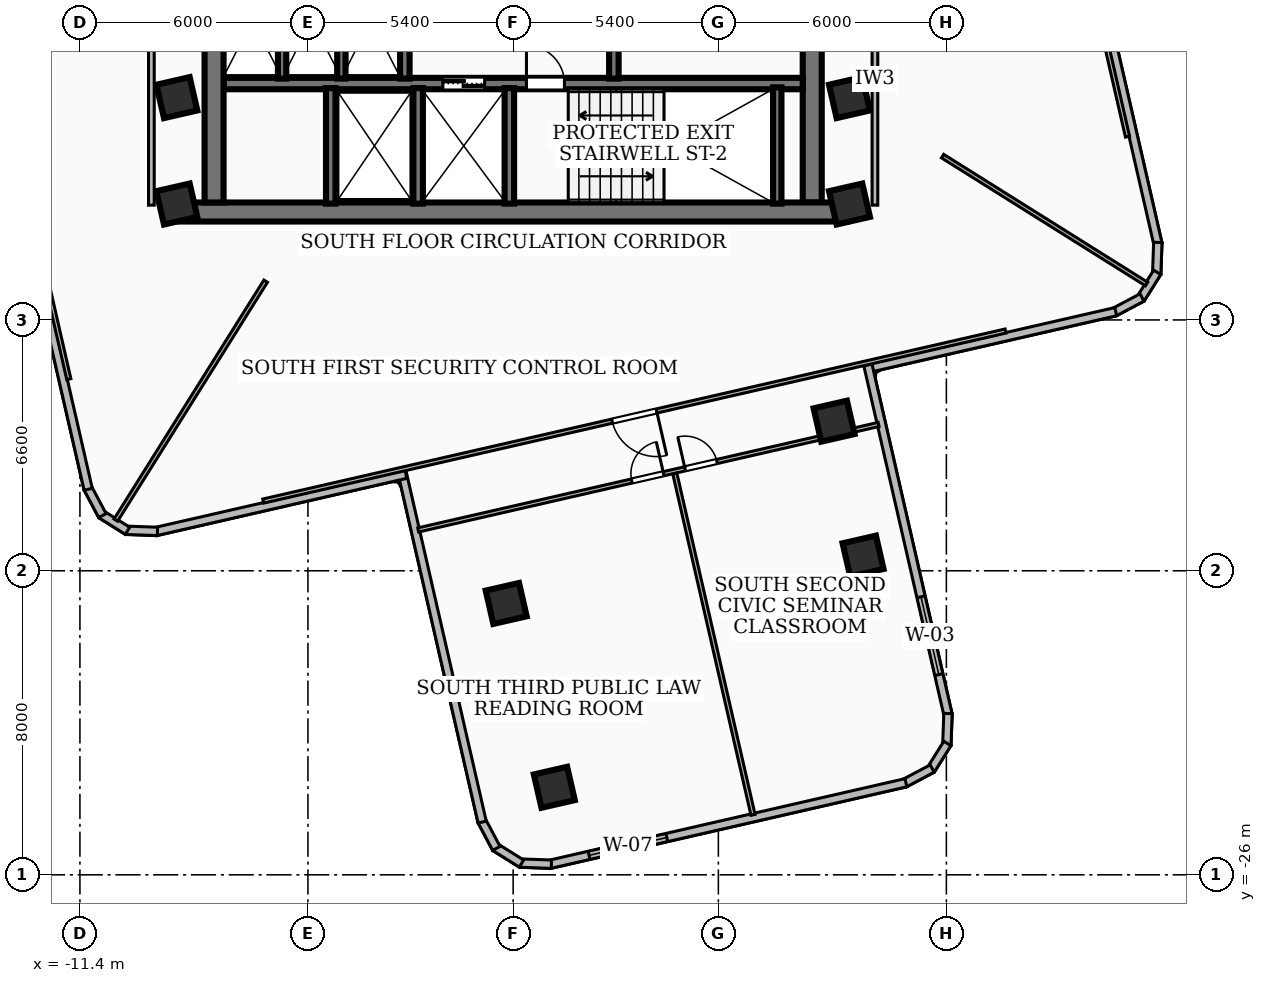
"""IFC4 building model, lengths in metres.
Left out: names, types, materials, properties, quantities, classifications, styles, units other than length and angle.
Written with IfcOpenShell. Run it as: python <this file> out.ifc"""

import sys

from ifc_helpers import new_model, si_unit, direction, frame, frame_2d, origin, origin_2d, place, context, subcontext, project, spatial, rectangle, extrude, element, fill, save


model = new_model("IFC4")
c1 = context("Model", 3, precision=1e-05, world=origin(), true_north=direction((0.0, 1.0)))
c2 = subcontext(c1, "Body", "Model", "MODEL_VIEW")
j1 = project(units=[si_unit("LENGTHUNIT", "METRE"), si_unit("PLANEANGLEUNIT", "RADIAN")], contexts=[c1])
p1 = place(None, origin())
s1 = spatial("IfcSite", under=j1, at=p1, CompositionType="ELEMENT")
p2 = place(p1, origin())
s2 = spatial("IfcBuilding", under=s1, at=p2, CompositionType="ELEMENT")
p3 = place(p2, frame((0.0, 0.0, 119.88)))
s3 = spatial("IfcBuildingStorey", under=s2, at=p3, CompositionType="ELEMENT", Elevation=119.88)
p4 = place(p3, frame((8.78, -8.56, 0.0), z_axis=(0.0, 0.0, 1.0), x_axis=(-1.0, 0.0, 0.0)))
e1 = element("IfcWall", 1, at=p4, inside=s3, PredefinedType="SHEAR", context=c2, shape_type="SweptSolid", body=[
    extrude(rectangle(XDim=17.56, YDim=0.5, at=frame_2d((8.78, 0.0))), origin(), (0.0, 0.0, 1.0), 3.34),
])
for number, where, z_axis, x_axis in (
    (2, (-7.87, -8.31, 0.0), (0.0, 0.0, 1.0), (0.0, 1.0, 0.0)),
    (3, (7.87, -2.0, 0.0), (0.0, 0.0, 1.0), (0.0, -1.0, 0.0)),
):
    element("IfcWall", number, at=place(p3, frame(where, z_axis=z_axis, x_axis=x_axis)), inside=s3, PredefinedType="SHEAR", context=c2, shape_type="SweptSolid", body=[
        extrude(rectangle(XDim=6.31, YDim=0.5, at=frame_2d((3.155, 0.0))), origin(), (0.0, 0.0, 1.0), 3.34),
    ])
p5 = place(p3, frame((-7.62, -5.18, 0.0), z_axis=(0.0, 0.0, 1.0), x_axis=(1.0, 0.0, 0.0)))
e4 = element("IfcWall", 4, at=p5, inside=s3, PredefinedType="SOLIDWALL", context=c2, shape_type="SweptSolid", body=[
    extrude(rectangle(XDim=15.24, YDim=0.3, at=frame_2d((7.62, 0.0))), origin(), (0.0, 0.0, 1.0), 3.34),
])
p6 = place(p5, frame((5.77, 0.0, 0.0)))
e5 = element("IfcOpeningElement", 5, at=p6, cuts=e4, PredefinedType="OPENING", context=c2, shape_type="SweptSolid", body=[
    extrude(rectangle(XDim=1.1, YDim=2.15, at=frame_2d((0.55, 1.075))), frame((0.0, 0.16, 0.0), z_axis=(0.0, -1.0, 0.0), x_axis=(1.0, 0.0, 0.0)), (0.0, 0.0, 1.0), 0.32),
])
p7 = place(p5, frame((7.97, 0.0, 0.0)))
e6 = element("IfcOpeningElement", 6, at=p7, cuts=e4, PredefinedType="OPENING", context=c2, shape_type="SweptSolid", body=[
    extrude(rectangle(XDim=1.0, YDim=2.1, at=frame_2d((0.5, 1.05))), frame((0.0, 0.16, 0.0), z_axis=(0.0, -1.0, 0.0), x_axis=(1.0, 0.0, 0.0)), (0.0, 0.0, 1.0), 0.32),
])
p8 = place(p3, frame((6.95, -8.34, 0.0), z_axis=(0.0, 0.0, 1.0), x_axis=(0.0, 1.0, 0.0)))
e7 = element("IfcWall", 7, at=p8, inside=s3, PredefinedType="SOLIDWALL", context=c2, shape_type="SweptSolid", body=[
    extrude(rectangle(XDim=3.06, YDim=0.22, at=frame_2d((1.53, 0.0))), origin(), (0.0, 0.0, 1.0), 3.34),
])
for number, where, z_axis, x_axis in (
    (8, (-0.1, -8.34, 0.0), (0.0, 0.0, 1.0), (0.0, 1.0, 0.0)),
    (9, (-2.5, -8.34, 0.0), (0.0, 0.0, 1.0), (0.0, 1.0, 0.0)),
    (10, (-4.8, -8.34, 0.0), (0.0, 0.0, 1.0), (0.0, 1.0, 0.0)),
):
    element("IfcWall", number, at=place(p3, frame(where, z_axis=z_axis, x_axis=x_axis)), inside=s3, PredefinedType="SOLIDWALL", context=c2, shape_type="SweptSolid", body=[
        extrude(rectangle(XDim=3.04, YDim=0.25, at=frame_2d((1.52, 0.0))), origin(), (0.0, 0.0, 1.0), 3.34),
    ])
for number, where, z_axis, x_axis in (
    (11, (-2.85, -5.05, 0.0), (0.0, 0.0, 1.0), (0.0, 1.0, 0.0)),
    (12, (2.65, -5.05, 0.0), (0.0, 0.0, 1.0), (0.0, 1.0, 0.0)),
):
    element("IfcWall", number, at=place(p3, frame(where, z_axis=z_axis, x_axis=x_axis)), inside=s3, PredefinedType="SOLIDWALL", context=c2, shape_type="SweptSolid", body=[
        extrude(rectangle(XDim=3.07, YDim=0.25, at=frame_2d((1.535, 0.0))), origin(), (0.0, 0.0, 1.0), 3.34),
    ])
for number, where, z_axis, x_axis in (
    (13, (-6.08, -5.05, 0.0), (0.0, 0.0, 1.0), (0.0, 1.0, 0.0)),
    (14, (-4.52, -5.05, 0.0), (0.0, 0.0, 1.0), (0.0, 1.0, 0.0)),
):
    element("IfcWall", number, at=place(p3, frame(where, z_axis=z_axis, x_axis=x_axis)), inside=s3, PredefinedType="SOLIDWALL", context=c2, shape_type="SweptSolid", body=[
        extrude(rectangle(XDim=3.07, YDim=0.22, at=frame_2d((1.535, 0.0))), origin(), (0.0, 0.0, 1.0), 3.34),
    ])
for number, where, z_axis, x_axis in (
    (15, (-8.85, -5.55, 0.0), (0.0, 0.0, 1.0), (0.975, 0.223, 0.0)),
    (16, (8.85, -5.55, 0.0), (0.0, 0.0, 1.0), (0.975, 0.223, 0.0)),
    (17, (8.85, -8.35, 0.0), (0.0, 0.0, 1.0), (0.975, 0.223, 0.0)),
    (18, (-8.85, -8.35, 0.0), (0.0, 0.0, 1.0), (0.975, 0.223, 0.0)),
    (19, (-0.183, -18.86, 0.0), (0.0, 0.0, 1.0), (0.975, 0.223, 0.0)),
    (20, (8.445, -14.064, 0.0), (0.0, 0.0, 1.0), (0.975, 0.223, 0.0)),
    (21, (1.083, -23.697, 0.0), (0.0, 0.0, 1.0), (0.975, 0.223, 0.0)),
    (22, (9.208, -17.615, 0.0), (0.0, 0.0, 1.0), (0.975, 0.223, 0.0)),
):
    element("IfcColumn", number, at=place(p3, frame(where, z_axis=z_axis, x_axis=x_axis)), inside=s3, PredefinedType="COLUMN", context=c2, shape_type="SweptSolid", body=[
        extrude(rectangle(XDim=0.9, YDim=0.9, at=origin_2d()), origin(), (0.0, 0.0, 1.0), 3.6),
    ])
p9 = place(p3, frame((15.46, -2.821, 0.0), z_axis=(0.0, 0.0, 1.0), x_axis=(0.223278912438, -0.974754598481, 0.0)))
e23 = element("IfcWall", 23, at=p9, inside=s3, PredefinedType="SOLIDWALL", context=c2, shape_type="SweptSolid", body=[
    extrude(rectangle(XDim=6.759, YDim=0.22, at=frame_2d((3.379, 0.0))), origin(), (0.0, 0.0, 1.0), 3.34),
])
p10 = place(p3, frame((16.964, -9.36, 0.0), z_axis=(0.0, 0.0, 1.0), x_axis=(-0.035983706773, -0.999352376715, 0.0)))
e24 = element("IfcWall", 24, at=p10, inside=s3, PredefinedType="SOLIDWALL", context=c2, shape_type="SweptSolid", body=[
    extrude(rectangle(XDim=0.834, YDim=0.22, at=frame_2d((0.417, 0.0))), origin(), (0.0, 0.0, 1.0), 3.34),
])
p11 = place(p3, frame((16.948, -10.148, 0.0), z_axis=(0.0, 0.0, 1.0), x_axis=(-0.531096868492, -0.847311109497, 0.0)))
e25 = element("IfcWall", 25, at=p11, inside=s3, PredefinedType="SOLIDWALL", context=c2, shape_type="SweptSolid", body=[
    extrude(rectangle(XDim=0.819, YDim=0.22, at=frame_2d((0.41, 0.0))), origin(), (0.0, 0.0, 1.0), 3.34),
])
p12 = place(p3, frame((16.548, -10.809, 0.0), z_axis=(0.0, 0.0, 1.0), x_axis=(-0.883460266876, -0.468506090516, 0.0)))
e26 = element("IfcWall", 26, at=p12, inside=s3, PredefinedType="SOLIDWALL", context=c2, shape_type="SweptSolid", body=[
    extrude(rectangle(XDim=0.834, YDim=0.22, at=frame_2d((0.417, 0.0))), origin(), (0.0, 0.0, 1.0), 3.34),
])
p13 = place(p3, frame((15.857, -11.182, 0.0), z_axis=(0.0, 0.0, 1.0), x_axis=(-0.974754598481, -0.223278912438, 0.0)))
e27 = element("IfcWall", 27, at=p13, inside=s3, PredefinedType="SOLIDWALL", context=c2, shape_type="SweptSolid", body=[
    extrude(rectangle(XDim=6.759, YDim=0.22, at=frame_2d((3.379, 0.0))), origin(), (0.0, 0.0, 1.0), 3.34),
])
p14 = place(p3, frame((9.335, -12.585, 0.0), z_axis=(0.0, 0.0, 1.0), x_axis=(0.223290835532, -0.974751867281, 0.0)))
e28 = element("IfcWall", 28, at=p14, inside=s3, PredefinedType="SOLIDWALL", context=c2, shape_type="SweptSolid", body=[
    extrude(rectangle(XDim=9.459, YDim=0.22, at=frame_2d((4.729, 0.0))), origin(), (0.0, 0.0, 1.0), 3.34),
])
p15 = place(p14, frame((6.259, 0.0, 0.85)))
e29 = element("IfcOpeningElement", 29, at=p15, cuts=e28, PredefinedType="OPENING", context=c2, shape_type="SweptSolid", body=[
    extrude(rectangle(XDim=2.1, YDim=2.0, at=frame_2d((1.05, 1.0))), frame((0.0, 0.12, 0.0), z_axis=(0.0, -1.0, 0.0), x_axis=(1.0, 0.0, 0.0)), (0.0, 0.0, 1.0), 0.24),
])
p16 = place(p3, frame((11.442, -21.756, 0.0), z_axis=(0.0, 0.0, 1.0), x_axis=(-0.035691530512, -0.999362854348, 0.0)))
e30 = element("IfcWall", 30, at=p16, inside=s3, PredefinedType="SOLIDWALL", context=c2, shape_type="SweptSolid", body=[
    extrude(rectangle(XDim=0.834, YDim=0.22, at=frame_2d((0.417, 0.0))), origin(), (0.0, 0.0, 1.0), 3.34),
])
p17 = place(p3, frame((11.426, -22.544, 0.0), z_axis=(0.0, 0.0, 1.0), x_axis=(-0.53163377074, -0.846974340702, 0.0)))
e31 = element("IfcWall", 31, at=p17, inside=s3, PredefinedType="SOLIDWALL", context=c2, shape_type="SweptSolid", body=[
    extrude(rectangle(XDim=0.818, YDim=0.22, at=frame_2d((0.409, 0.0))), origin(), (0.0, 0.0, 1.0), 3.34),
])
p18 = place(p3, frame((11.026, -23.204, 0.0), z_axis=(0.0, 0.0, 1.0), x_axis=(-0.883396009524, -0.468627240307, 0.0)))
e32 = element("IfcWall", 32, at=p18, inside=s3, PredefinedType="SOLIDWALL", context=c2, shape_type="SweptSolid", body=[
    extrude(rectangle(XDim=0.834, YDim=0.22, at=frame_2d((0.417, 0.0))), origin(), (0.0, 0.0, 1.0), 3.34),
])
p19 = place(p3, frame((10.335, -23.577, 0.0), z_axis=(0.0, 0.0, 1.0), x_axis=(-0.974730937235, -0.223382183705, 0.0)))
e33 = element("IfcWall", 33, at=p19, inside=s3, PredefinedType="SOLIDWALL", context=c2, shape_type="SweptSolid", body=[
    extrude(rectangle(XDim=9.621, YDim=0.22, at=frame_2d((4.811, 0.0))), origin(), (0.0, 0.0, 1.0), 3.34),
])
p20 = place(p19, frame((6.454, 0.0, 0.85)))
e34 = element("IfcOpeningElement", 34, at=p20, cuts=e33, PredefinedType="OPENING", context=c2, shape_type="SweptSolid", body=[
    extrude(rectangle(XDim=2.1, YDim=1.8, at=frame_2d((1.05, 0.9))), frame((0.0, 0.12, 0.0), z_axis=(0.0, -1.0, 0.0), x_axis=(1.0, 0.0, 0.0)), (0.0, 0.0, 1.0), 0.24),
])
p21 = place(p3, frame((1.006, -25.721, 0.0), z_axis=(0.0, 0.0, 1.0), x_axis=(-0.999307996296, 0.037195813461, 0.0)))
e35 = element("IfcWall", 35, at=p21, inside=s3, PredefinedType="SOLIDWALL", context=c2, shape_type="SweptSolid", body=[
    extrude(rectangle(XDim=0.833, YDim=0.22, at=frame_2d((0.417, 0.0))), origin(), (0.0, 0.0, 1.0), 3.34),
])
p22 = place(p3, frame((0.219, -25.704, 0.0), z_axis=(0.0, 0.0, 1.0), x_axis=(-0.847847482865, 0.530240177466, 0.0)))
e36 = element("IfcWall", 36, at=p22, inside=s3, PredefinedType="SOLIDWALL", context=c2, shape_type="SweptSolid", body=[
    extrude(rectangle(XDim=0.819, YDim=0.22, at=frame_2d((0.409, 0.0))), origin(), (0.0, 0.0, 1.0), 3.34),
])
p23 = place(p3, frame((-0.442, -25.305, 0.0), z_axis=(0.0, 0.0, 1.0), x_axis=(-0.468250279951, 0.883595877835, 0.0)))
e37 = element("IfcWall", 37, at=p23, inside=s3, PredefinedType="SOLIDWALL", context=c2, shape_type="SweptSolid", body=[
    extrude(rectangle(XDim=0.835, YDim=0.22, at=frame_2d((0.417, 0.0))), origin(), (0.0, 0.0, 1.0), 3.34),
])
p24 = place(p3, frame((-0.815, -24.613, 0.0), z_axis=(0.0, 0.0, 1.0), x_axis=(-0.223313309104, 0.974746718885, 0.0)))
e38 = element("IfcWall", 38, at=p24, inside=s3, PredefinedType="SOLIDWALL", context=c2, shape_type="SweptSolid", body=[
    extrude(rectangle(XDim=9.458, YDim=0.22, at=frame_2d((4.729, 0.0))), origin(), (0.0, 0.0, 1.0), 2.57),
])
p25 = place(p3, frame((-2.821, -15.46, 0.0), z_axis=(0.0, 0.0, 1.0), x_axis=(-0.974754598481, -0.223278912438, 0.0)))
e39 = element("IfcWall", 39, at=p25, inside=s3, PredefinedType="SOLIDWALL", context=c2, shape_type="SweptSolid", body=[
    extrude(rectangle(XDim=6.759, YDim=0.22, at=frame_2d((3.379, 0.0))), origin(), (0.0, 0.0, 1.0), 2.57),
])
p26 = place(p3, frame((-9.36, -16.964, 0.0), z_axis=(0.0, 0.0, 1.0), x_axis=(-0.999352376715, 0.035983706773, 0.0)))
e40 = element("IfcWall", 40, at=p26, inside=s3, PredefinedType="SOLIDWALL", context=c2, shape_type="SweptSolid", body=[
    extrude(rectangle(XDim=0.834, YDim=0.22, at=frame_2d((0.417, 0.0))), origin(), (0.0, 0.0, 1.0), 3.34),
])
p27 = place(p3, frame((-10.148, -16.948, 0.0), z_axis=(0.0, 0.0, 1.0), x_axis=(-0.847311109497, 0.531096868492, 0.0)))
e41 = element("IfcWall", 41, at=p27, inside=s3, PredefinedType="SOLIDWALL", context=c2, shape_type="SweptSolid", body=[
    extrude(rectangle(XDim=0.819, YDim=0.22, at=frame_2d((0.41, 0.0))), origin(), (0.0, 0.0, 1.0), 3.34),
])
p28 = place(p3, frame((-10.809, -16.548, 0.0), z_axis=(0.0, 0.0, 1.0), x_axis=(-0.468506090516, 0.883460266876, 0.0)))
e42 = element("IfcWall", 42, at=p28, inside=s3, PredefinedType="SOLIDWALL", context=c2, shape_type="SweptSolid", body=[
    extrude(rectangle(XDim=0.834, YDim=0.22, at=frame_2d((0.417, 0.0))), origin(), (0.0, 0.0, 1.0), 3.34),
])
p29 = place(p3, frame((-11.182, -15.857, 0.0), z_axis=(0.0, 0.0, 1.0), x_axis=(-0.223278912438, 0.974754598481, 0.0)))
e43 = element("IfcWall", 43, at=p29, inside=s3, PredefinedType="SOLIDWALL", context=c2, shape_type="SweptSolid", body=[
    extrude(rectangle(XDim=6.759, YDim=0.22, at=frame_2d((3.379, 0.0))), origin(), (0.0, 0.0, 1.0), 3.34),
])
for number, where, z_axis, x_axis in (
    (44, (-9.52, -8.38, 0.0), (0.0, 0.0, 1.0), (0.0, 1.0, 0.0)),
    (45, (9.52, -8.38, 0.0), (0.0, 0.0, 1.0), (0.0, 1.0, 0.0)),
):
    element("IfcWall", number, at=place(p3, frame(where, z_axis=z_axis, x_axis=x_axis)), inside=s3, PredefinedType="PARTITIONING", context=c2, shape_type="SweptSolid", body=[
        extrude(rectangle(XDim=6.63, YDim=0.15, at=frame_2d((3.315, 0.0))), origin(), (0.0, 0.0, 1.0), 2.57),
    ])
p30 = place(p3, frame((-6.512, -10.38, 0.0), z_axis=(0.0, 0.0, 1.0), x_axis=(-0.531323053356, -0.847169294163, 0.0)))
e46 = element("IfcWall", 46, at=p30, inside=s3, PredefinedType="PARTITIONING", context=c2, shape_type="SweptSolid", body=[
    extrude(rectangle(XDim=7.421, YDim=0.11, at=frame_2d((3.711, 0.0))), origin(), (0.0, 0.0, 1.0), 2.57),
])
p31 = place(p3, frame((11.3, -7.089, 0.0), z_axis=(0.0, 0.0, 1.0), x_axis=(0.847172398776, -0.531318103167, 0.0)))
e47 = element("IfcWall", 47, at=p31, inside=s3, PredefinedType="PARTITIONING", context=c2, shape_type="SweptSolid", body=[
    extrude(rectangle(XDim=6.335, YDim=0.11, at=frame_2d((3.167, 0.0))), origin(), (0.0, 0.0, 1.0), 3.34),
])
p32 = place(p3, frame((11.692, 12.957, 0.0), z_axis=(0.0, 0.0, 1.0), x_axis=(0.223262093598, -0.97475845088, 0.0)))
e48 = element("IfcWall", 48, at=p32, inside=s3, PredefinedType="PARTITIONING", context=c2, shape_type="SweptSolid", body=[
    extrude(rectangle(XDim=20.04, YDim=0.11, at=frame_2d((10.02, 0.0))), origin(), (0.0, 0.0, 1.0), 2.57),
])
p33 = place(p32, frame((9.42, 0.0, 0.0)))
e49 = element("IfcOpeningElement", 49, at=p33, cuts=e48, PredefinedType="OPENING", context=c2, shape_type="SweptSolid", body=[
    extrude(rectangle(XDim=1.2, YDim=2.1, at=frame_2d((0.6, 1.05))), frame((0.0, 0.065, 0.0), z_axis=(0.0, -1.0, 0.0), x_axis=(1.0, 0.0, 0.0)), (0.0, 0.0, 1.0), 0.13),
])
p34 = place(p3, frame((-11.692, -12.957, 0.0), z_axis=(0.0, 0.0, 1.0), x_axis=(-0.223262093598, 0.97475845088, 0.0)))
e50 = element("IfcWall", 50, at=p34, inside=s3, PredefinedType="PARTITIONING", context=c2, shape_type="SweptSolid", body=[
    extrude(rectangle(XDim=20.04, YDim=0.11, at=frame_2d((10.02, 0.0))), origin(), (0.0, 0.0, 1.0), 2.57),
])
p35 = place(p34, frame((9.42, 0.0, 0.0)))
e51 = element("IfcOpeningElement", 51, at=p35, cuts=e50, PredefinedType="OPENING", context=c2, shape_type="SweptSolid", body=[
    extrude(rectangle(XDim=1.2, YDim=2.1, at=frame_2d((0.6, 1.05))), frame((0.0, 0.065, 0.0), z_axis=(0.0, -1.0, 0.0), x_axis=(1.0, 0.0, 0.0)), (0.0, 0.0, 1.0), 0.13),
])
p36 = place(p3, frame((12.957, -11.692, 0.0), z_axis=(0.0, 0.0, 1.0), x_axis=(-0.97475845088, -0.223262093598, 0.0)))
e52 = element("IfcWall", 52, at=p36, inside=s3, PredefinedType="PARTITIONING", context=c2, shape_type="SweptSolid", body=[
    extrude(rectangle(XDim=20.04, YDim=0.11, at=frame_2d((10.02, 0.0))), origin(), (0.0, 0.0, 1.0), 2.57),
])
p37 = place(p36, frame((9.42, 0.0, 0.0)))
e53 = element("IfcOpeningElement", 53, at=p37, cuts=e52, PredefinedType="OPENING", context=c2, shape_type="SweptSolid", body=[
    extrude(rectangle(XDim=1.2, YDim=2.1, at=frame_2d((0.6, 1.05))), frame((0.0, 0.065, 0.0), z_axis=(0.0, -1.0, 0.0), x_axis=(1.0, 0.0, 0.0)), (0.0, 0.0, 1.0), 0.13),
])
p38 = place(p3, frame((4.254, -15.44, 0.0), z_axis=(0.0, 0.0, 1.0), x_axis=(0.223344166789, -0.974739648912, 0.0)))
e54 = element("IfcWall", 54, at=p38, inside=s3, PredefinedType="PARTITIONING", context=c2, shape_type="SweptSolid", body=[
    extrude(rectangle(XDim=9.215, YDim=0.11, at=frame_2d((4.607, 0.0))), origin(), (0.0, 0.0, 1.0), 2.72),
])
p39 = place(p3, frame((-2.499, -16.926, 0.0), z_axis=(0.0, 0.0, 1.0), x_axis=(0.974740247341, 0.223341555051, 0.0)))
e55 = element("IfcWall", 55, at=p39, inside=s3, PredefinedType="PARTITIONING", context=c2, shape_type="SweptSolid", body=[
    extrude(rectangle(XDim=12.43, YDim=0.11, at=frame_2d((6.215, 0.0))), origin(), (0.0, 0.0, 1.0), 2.57),
])
p40 = place(p39, frame((5.765, 0.0, 0.0)))
e56 = element("IfcOpeningElement", 56, at=p40, cuts=e55, PredefinedType="OPENING", context=c2, shape_type="SweptSolid", body=[
    extrude(rectangle(XDim=0.86, YDim=2.04, at=frame_2d((0.43, 1.02))), frame((0.0, 0.065, 0.0), z_axis=(0.0, -1.0, 0.0), x_axis=(1.0, 0.0, 0.0)), (0.0, 0.0, 1.0), 0.13),
])
p41 = place(p39, frame((7.205, 0.0, 0.0)))
e57 = element("IfcOpeningElement", 57, at=p41, cuts=e55, PredefinedType="OPENING", context=c2, shape_type="SweptSolid", body=[
    extrude(rectangle(XDim=0.86, YDim=2.04, at=frame_2d((0.43, 1.02))), frame((0.0, 0.065, 0.0), z_axis=(0.0, -1.0, 0.0), x_axis=(1.0, 0.0, 0.0)), (0.0, 0.0, 1.0), 0.13),
])
p42 = place(p15, origin())
e58 = element("IfcWindow", 58, at=p42, inside=s3, PartitioningType="SINGLE_PANEL", PredefinedType="WINDOW", context=c2, shape_type="SweptSolid", body=[
    extrude(rectangle(XDim=2.1, YDim=2.0, at=frame_2d((1.05, 1.0))), frame((0.0, 0.03, 0.0), z_axis=(0.0, -1.0, 0.0), x_axis=(1.0, 0.0, 0.0)), (0.0, 0.0, 1.0), 0.06),
])
fill(e29, e58)
p43 = place(p20, origin())
e59 = element("IfcWindow", 59, at=p43, inside=s3, PartitioningType="SINGLE_PANEL", PredefinedType="WINDOW", context=c2, shape_type="SweptSolid", body=[
    extrude(rectangle(XDim=2.1, YDim=1.8, at=frame_2d((1.05, 0.9))), frame((0.0, 0.03, 0.0), z_axis=(0.0, -1.0, 0.0), x_axis=(1.0, 0.0, 0.0)), (0.0, 0.0, 1.0), 0.06),
])
fill(e34, e59)
p44 = place(p6, origin())
e60 = element("IfcDoor", 60, at=p44, inside=s3, OperationType="DOUBLE_DOOR_SLIDING", PredefinedType="DOOR", context=c2, shape_type="SweptSolid", body=[
    extrude(rectangle(XDim=1.1, YDim=2.15, at=frame_2d((0.55, 1.075))), frame((0.0, 0.025, 0.0), z_axis=(0.0, -1.0, 0.0), x_axis=(1.0, 0.0, 0.0)), (0.0, 0.0, 1.0), 0.05),
])
fill(e5, e60)
p45 = place(p7, origin())
e61 = element("IfcDoor", 61, at=p45, inside=s3, OperationType="SINGLE_SWING_LEFT", PredefinedType="DOOR", context=c2, shape_type="SweptSolid", body=[
    extrude(rectangle(XDim=1.0, YDim=2.1, at=frame_2d((0.5, 1.05))), frame((0.0, 0.025, 0.0), z_axis=(0.0, -1.0, 0.0), x_axis=(1.0, 0.0, 0.0)), (0.0, 0.0, 1.0), 0.05),
])
fill(e6, e61)
p46 = place(p37, origin())
e62 = element("IfcDoor", 62, at=p46, inside=s3, OperationType="SINGLE_SWING_LEFT", PredefinedType="DOOR", context=c2, shape_type="SweptSolid", body=[
    extrude(rectangle(XDim=1.2, YDim=2.1, at=frame_2d((0.6, 1.05))), frame((0.0, 0.025, 0.0), z_axis=(0.0, -1.0, 0.0), x_axis=(1.0, 0.0, 0.0)), (0.0, 0.0, 1.0), 0.05),
])
fill(e53, e62)
p47 = place(p40, origin())
e63 = element("IfcDoor", 63, at=p47, inside=s3, OperationType="SINGLE_SWING_RIGHT", PredefinedType="DOOR", context=c2, shape_type="SweptSolid", body=[
    extrude(rectangle(XDim=0.86, YDim=2.04, at=frame_2d((0.43, 1.02))), frame((0.0, 0.025, 0.0), z_axis=(0.0, -1.0, 0.0), x_axis=(1.0, 0.0, 0.0)), (0.0, 0.0, 1.0), 0.05),
])
fill(e56, e63)
p48 = place(p41, origin())
e64 = element("IfcDoor", 64, at=p48, inside=s3, OperationType="SINGLE_SWING_LEFT", PredefinedType="DOOR", context=c2, shape_type="SweptSolid", body=[
    extrude(rectangle(XDim=0.86, YDim=2.04, at=frame_2d((0.43, 1.02))), frame((0.0, 0.025, 0.0), z_axis=(0.0, -1.0, 0.0), x_axis=(1.0, 0.0, 0.0)), (0.0, 0.0, 1.0), 0.05),
])
fill(e57, e64)
save(model, sys.argv[1])
